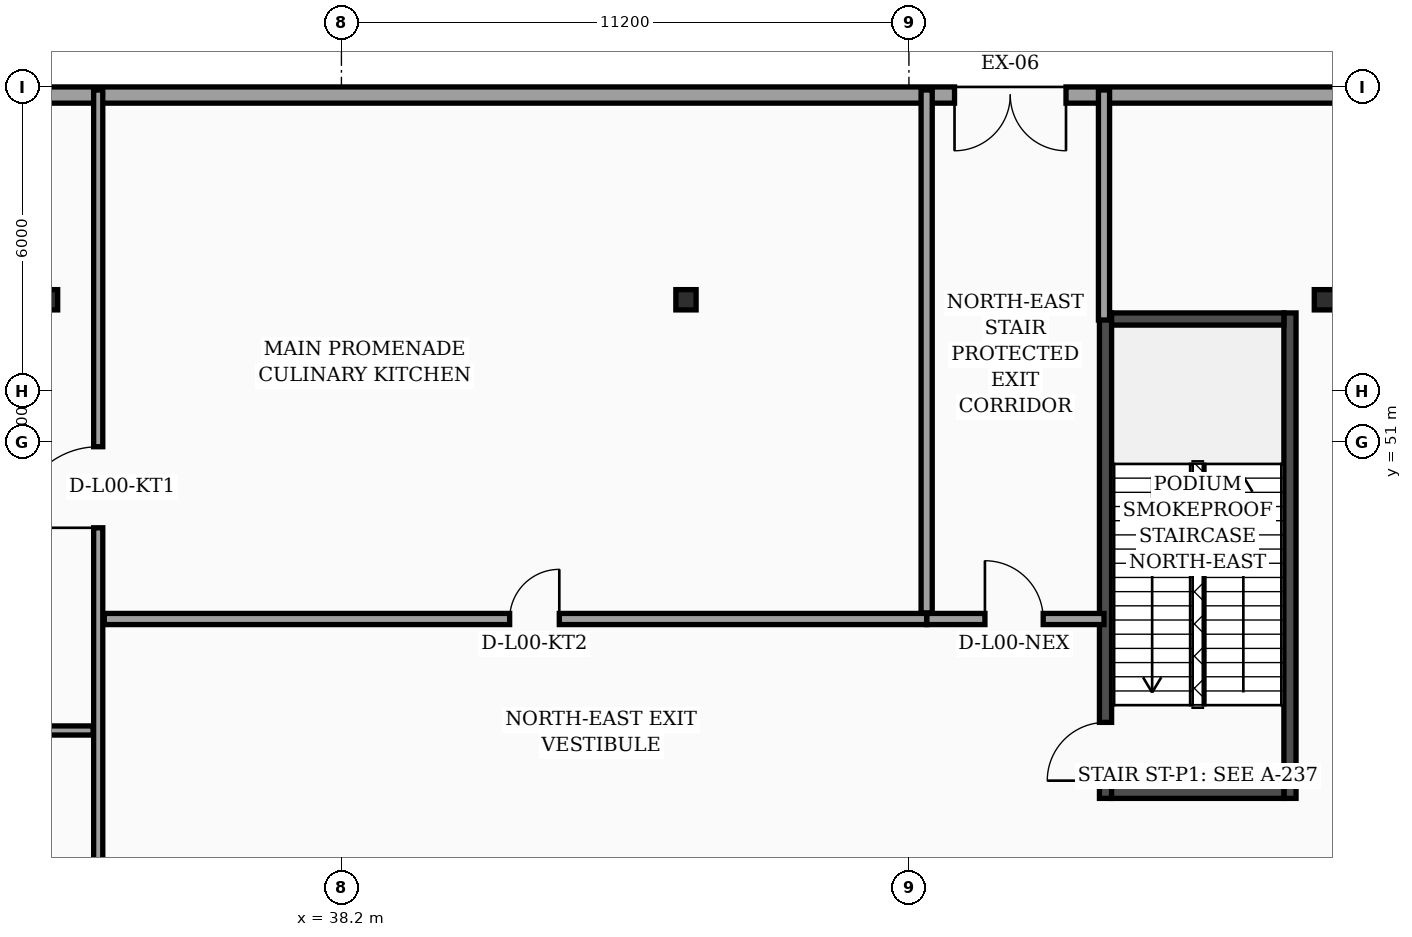
"""IFC4 building model, lengths in metres.
Left out: names, types, materials, properties, quantities, classifications, styles, units other than length and angle.
Written with IfcOpenShell. Run it as: python <this file> out.ifc"""

import sys

from ifc_helpers import new_model, si_unit, direction, frame, frame_2d, origin, origin_2d, place, context, subcontext, project, spatial, rectangle, i_section, extrude, element, fill, save


model = new_model("IFC4")
c1 = context("Model", 3, precision=1e-05, world=origin(), true_north=direction((0.0, 1.0)))
c2 = subcontext(c1, "Body", "Model", "MODEL_VIEW")
j1 = project(units=[si_unit("LENGTHUNIT", "METRE"), si_unit("PLANEANGLEUNIT", "RADIAN")], contexts=[c1])
p1 = place(None, origin())
s1 = spatial("IfcSite", under=j1, at=p1, CompositionType="ELEMENT")
p2 = place(p1, origin())
s2 = spatial("IfcBuilding", under=s1, at=p2, CompositionType="ELEMENT")
p3 = place(p2, origin())
s3 = spatial("IfcBuildingStorey", under=s2, at=p3, CompositionType="ELEMENT", Elevation=0.0)
p4 = place(p3, frame((53.28, 43.96, 0.0), z_axis=(0.0, 0.0, 1.0), x_axis=(0.0, 1.0, 0.0)))
e1 = element("IfcWall", 1, at=p4, inside=s3, PredefinedType="SOLIDWALL", context=c2, shape_type="SweptSolid", body=[
    extrude(rectangle(XDim=9.58, YDim=0.24, at=frame_2d((4.79, 0.0))), origin(), (0.0, 0.0, 1.0), 5.68),
])
p5 = place(p4, frame((0.35, 0.0, 0.0)))
e2 = element("IfcOpeningElement", 2, at=p5, cuts=e1, PredefinedType="OPENING", context=c2, shape_type="SweptSolid", body=[
    extrude(rectangle(XDim=1.15, YDim=2.2, at=frame_2d((0.575, 1.1))), frame((0.0, 0.13, 0.0), z_axis=(0.0, -1.0, 0.0), x_axis=(1.0, 0.0, 0.0)), (0.0, 0.0, 1.0), 0.26),
])
p6 = place(p3, frame((56.92, 43.96, 0.0), z_axis=(0.0, 0.0, 1.0), x_axis=(0.0, 1.0, 0.0)))
e3 = element("IfcWall", 3, at=p6, inside=s3, PredefinedType="SOLIDWALL", context=c2, shape_type="SweptSolid", body=[
    extrude(rectangle(XDim=9.58, YDim=0.24, at=frame_2d((4.79, 0.0))), origin(), (0.0, 0.0, 1.0), 5.68),
])
for number, where, z_axis, x_axis in (
    (4, (53.4, 44.08, 0.0), (0.0, 0.0, 1.0), (1.0, 0.0, 0.0)),
    (5, (53.4, 53.42, 0.0), (0.0, 0.0, 1.0), (1.0, 0.0, 0.0)),
):
    element("IfcWall", number, at=place(p3, frame(where, z_axis=z_axis, x_axis=x_axis)), inside=s3, PredefinedType="SOLIDWALL", context=c2, shape_type="SweptSolid", body=[
        extrude(rectangle(XDim=3.4, YDim=0.24, at=frame_2d((1.7, 0.0))), origin(), (0.0, 0.0, 1.0), 5.68),
    ])
for number, where, z_axis, x_axis in (
    (6, (32.4, 53.8, 0.0), (0.0, 0.0, 1.0), (1.0, 0.0, 0.0)),
    (7, (45.0, 53.8, 0.0), (0.0, 0.0, 1.0), (1.0, 0.0, 0.0)),
    (8, (57.6, 53.8, 0.0), (0.0, 0.0, 1.0), (1.0, 0.0, 0.0)),
):
    element("IfcColumn", number, at=place(p3, frame(where, z_axis=z_axis, x_axis=x_axis)), inside=s3, PredefinedType="PILASTER", context=c2, shape_type="SweptSolid", body=[
        extrude(i_section(OverallWidth=0.4, OverallDepth=0.4, WebThickness=0.013, FlangeThickness=0.021, FilletRadius=0.022, at=origin_2d()), origin(), (0.0, 0.0, 1.0), 5.68),
    ])
p7 = place(p3, frame((2.3, 57.84, 0.0), z_axis=(0.0, 0.0, 1.0), x_axis=(1.0, 0.0, 0.0)))
e9 = element("IfcWall", 9, at=p7, inside=s3, PredefinedType="SOLIDWALL", context=c2, shape_type="SweptSolid", body=[
    extrude(rectangle(XDim=79.4, YDim=0.32, at=frame_2d((39.7, 0.0))), origin(), (0.0, 0.0, 1.0), 5.68),
])
p8 = place(p7, frame((48.0, 0.0, 0.0)))
e10 = element("IfcOpeningElement", 10, at=p8, cuts=e9, PredefinedType="OPENING", context=c2, shape_type="SweptSolid", body=[
    extrude(rectangle(XDim=2.2, YDim=2.5, at=frame_2d((1.1, 1.25))), frame((0.0, 0.17, 0.0), z_axis=(0.0, -1.0, 0.0), x_axis=(1.0, 0.0, 0.0)), (0.0, 0.0, 1.0), 0.34),
])
p9 = place(p7, frame((57.0, 0.0, 0.0)))
e11 = element("IfcOpeningElement", 11, at=p9, cuts=e9, PredefinedType="OPENING", context=c2, shape_type="SweptSolid", body=[
    extrude(rectangle(XDim=4.2, YDim=2.8, at=frame_2d((2.1, 1.4))), frame((0.0, 0.17, 0.0), z_axis=(0.0, -1.0, 0.0), x_axis=(1.0, 0.0, 0.0)), (0.0, 0.0, 1.0), 0.34),
])
p10 = place(p7, frame((67.2, 0.0, 0.0)))
e12 = element("IfcOpeningElement", 12, at=p10, cuts=e9, PredefinedType="OPENING", context=c2, shape_type="SweptSolid", body=[
    extrude(rectangle(XDim=3.6, YDim=4.2, at=frame_2d((1.8, 2.1))), frame((0.0, 0.17, 0.0), z_axis=(0.0, -1.0, 0.0), x_axis=(1.0, 0.0, 0.0)), (0.0, 0.0, 1.0), 0.34),
])
p11 = place(p3, frame((49.75, 47.5, 0.0), z_axis=(0.0, 0.0, 1.0), x_axis=(1.0, 0.0, 0.0)))
e13 = element("IfcWall", 13, at=p11, inside=s3, PredefinedType="SOLIDWALL", context=c2, shape_type="SweptSolid", body=[
    extrude(rectangle(XDim=3.5, YDim=0.22, at=frame_2d((1.75, 0.0))), origin(), (0.0, 0.0, 1.0), 5.68),
])
p12 = place(p11, frame((1.15, 0.0, 0.0)))
e14 = element("IfcOpeningElement", 14, at=p12, cuts=e13, PredefinedType="OPENING", context=c2, shape_type="SweptSolid", body=[
    extrude(rectangle(XDim=1.15, YDim=2.2, at=frame_2d((0.575, 1.1))), frame((0.0, 0.12, 0.0), z_axis=(0.0, -1.0, 0.0), x_axis=(1.0, 0.0, 0.0)), (0.0, 0.0, 1.0), 0.24),
])
p13 = place(p3, frame((49.75, 47.62, 0.0), z_axis=(0.0, 0.0, 1.0), x_axis=(0.0, 1.0, 0.0)))
e15 = element("IfcWall", 15, at=p13, inside=s3, PredefinedType="SOLIDWALL", context=c2, shape_type="SweptSolid", body=[
    extrude(rectangle(XDim=10.32, YDim=0.22, at=frame_2d((5.16, 0.0))), origin(), (0.0, 0.0, 1.0), 4.88),
])
p14 = place(p3, frame((53.25, 53.4, 0.0), z_axis=(0.0, 0.0, 1.0), x_axis=(0.0, 1.0, 0.0)))
e16 = element("IfcWall", 16, at=p14, inside=s3, PredefinedType="SOLIDWALL", context=c2, shape_type="SweptSolid", body=[
    extrude(rectangle(XDim=4.54, YDim=0.22, at=frame_2d((2.27, 0.0))), origin(), (0.0, 0.0, 1.0), 4.88),
])
p15 = place(p3, frame((15.2, 45.3, 0.0), z_axis=(0.0, 0.0, 1.0), x_axis=(1.0, 0.0, 0.0)))
e17 = element("IfcWall", 17, at=p15, inside=s3, PredefinedType="PARTITIONING", context=c2, shape_type="SweptSolid", body=[
    extrude(rectangle(XDim=18.1, YDim=0.18, at=frame_2d((9.05, 0.0))), origin(), (0.0, 0.0, 1.0), 4.88),
])
p16 = place(p3, frame((33.4, 0.3, 0.0), z_axis=(0.0, 0.0, 1.0), x_axis=(0.0, 1.0, 0.0)))
e18 = element("IfcWall", 18, at=p16, inside=s3, PredefinedType="PARTITIONING", context=c2, shape_type="SweptSolid", body=[
    extrude(rectangle(XDim=57.64, YDim=0.18, at=frame_2d((28.82, 0.0))), origin(), (0.0, 0.0, 1.0), 4.88),
])
p17 = place(p16, frame((6.0, 0.0, 0.0)))
e19 = element("IfcOpeningElement", 19, at=p17, cuts=e18, PredefinedType="OPENING", context=c2, shape_type="SweptSolid", body=[
    extrude(rectangle(XDim=1.5, YDim=2.22, at=frame_2d((0.75, 1.11))), frame((0.0, 0.1, 0.0), z_axis=(0.0, -1.0, 0.0), x_axis=(1.0, 0.0, 0.0)), (0.0, 0.0, 1.0), 0.2),
])
p18 = place(p16, frame((20.0, 0.0, 0.0)))
e20 = element("IfcOpeningElement", 20, at=p18, cuts=e18, PredefinedType="OPENING", context=c2, shape_type="SweptSolid", body=[
    extrude(rectangle(XDim=1.8, YDim=2.4, at=frame_2d((0.9, 1.2))), frame((0.0, 0.1, 0.0), z_axis=(0.0, -1.0, 0.0), x_axis=(1.0, 0.0, 0.0)), (0.0, 0.0, 1.0), 0.2),
])
p19 = place(p16, frame((49.0, 0.0, 0.0)))
e21 = element("IfcOpeningElement", 21, at=p19, cuts=e18, PredefinedType="OPENING", context=c2, shape_type="SweptSolid", body=[
    extrude(rectangle(XDim=1.6, YDim=2.35, at=frame_2d((0.8, 1.175))), frame((0.0, 0.1, 0.0), z_axis=(0.0, -1.0, 0.0), x_axis=(1.0, 0.0, 0.0)), (0.0, 0.0, 1.0), 0.2),
])
p20 = place(p3, frame((33.52, 47.5, 0.0), z_axis=(0.0, 0.0, 1.0), x_axis=(1.0, 0.0, 0.0)))
e22 = element("IfcWall", 22, at=p20, inside=s3, PredefinedType="SOLIDWALL", context=c2, shape_type="SweptSolid", body=[
    extrude(rectangle(XDim=16.23, YDim=0.22, at=frame_2d((8.115, 0.0))), origin(), (0.0, 0.0, 1.0), 4.88),
])
p21 = place(p20, frame((8.0, 0.0, 0.0)))
e23 = element("IfcOpeningElement", 23, at=p21, cuts=e22, PredefinedType="OPENING", context=c2, shape_type="SweptSolid", body=[
    extrude(rectangle(XDim=0.98, YDim=2.15, at=frame_2d((0.49, 1.075))), frame((0.0, 0.12, 0.0), z_axis=(0.0, -1.0, 0.0), x_axis=(1.0, 0.0, 0.0)), (0.0, 0.0, 1.0), 0.24),
])
p22 = place(p8, origin())
e24 = element("IfcDoor", 24, at=p22, inside=s3, OperationType="DOUBLE_DOOR_SINGLE_SWING", PredefinedType="DOOR", context=c2, shape_type="SweptSolid", body=[
    extrude(rectangle(XDim=2.2, YDim=2.5, at=frame_2d((1.1, 1.25))), frame((0.0, 0.025, 0.0), z_axis=(0.0, -1.0, 0.0), x_axis=(1.0, 0.0, 0.0)), (0.0, 0.0, 1.0), 0.05),
])
fill(e10, e24)
p23 = place(p12, origin())
e25 = element("IfcDoor", 25, at=p23, inside=s3, OperationType="SINGLE_SWING_LEFT", PredefinedType="DOOR", context=c2, shape_type="SweptSolid", body=[
    extrude(rectangle(XDim=1.15, YDim=2.2, at=frame_2d((0.575, 1.1))), frame((0.0, 0.025, 0.0), z_axis=(0.0, -1.0, 0.0), x_axis=(1.0, 0.0, 0.0)), (0.0, 0.0, 1.0), 0.05),
])
fill(e14, e25)
p24 = place(p19, origin())
e26 = element("IfcDoor", 26, at=p24, inside=s3, OperationType="SINGLE_SWING_LEFT", PredefinedType="DOOR", context=c2, shape_type="SweptSolid", body=[
    extrude(rectangle(XDim=1.6, YDim=2.35, at=frame_2d((0.8, 1.175))), frame((0.0, 0.025, 0.0), z_axis=(0.0, -1.0, 0.0), x_axis=(1.0, 0.0, 0.0)), (0.0, 0.0, 1.0), 0.05),
])
fill(e21, e26)
p25 = place(p21, origin())
e27 = element("IfcDoor", 27, at=p25, inside=s3, OperationType="SINGLE_SWING_RIGHT", PredefinedType="DOOR", context=c2, shape_type="SweptSolid", body=[
    extrude(rectangle(XDim=0.98, YDim=2.15, at=frame_2d((0.49, 1.075))), frame((0.0, 0.025, 0.0), z_axis=(0.0, -1.0, 0.0), x_axis=(1.0, 0.0, 0.0)), (0.0, 0.0, 1.0), 0.05),
])
fill(e23, e27)
p26 = place(p5, origin())
e28 = element("IfcDoor", 28, at=p26, inside=s3, OperationType="SINGLE_SWING_LEFT", PredefinedType="DOOR", context=c2, shape_type="SweptSolid", body=[
    extrude(rectangle(XDim=1.15, YDim=2.2, at=frame_2d((0.575, 1.1))), frame((0.0, 0.025, 0.0), z_axis=(0.0, -1.0, 0.0), x_axis=(1.0, 0.0, 0.0)), (0.0, 0.0, 1.0), 0.05),
])
fill(e2, e28)
save(model, sys.argv[1])
